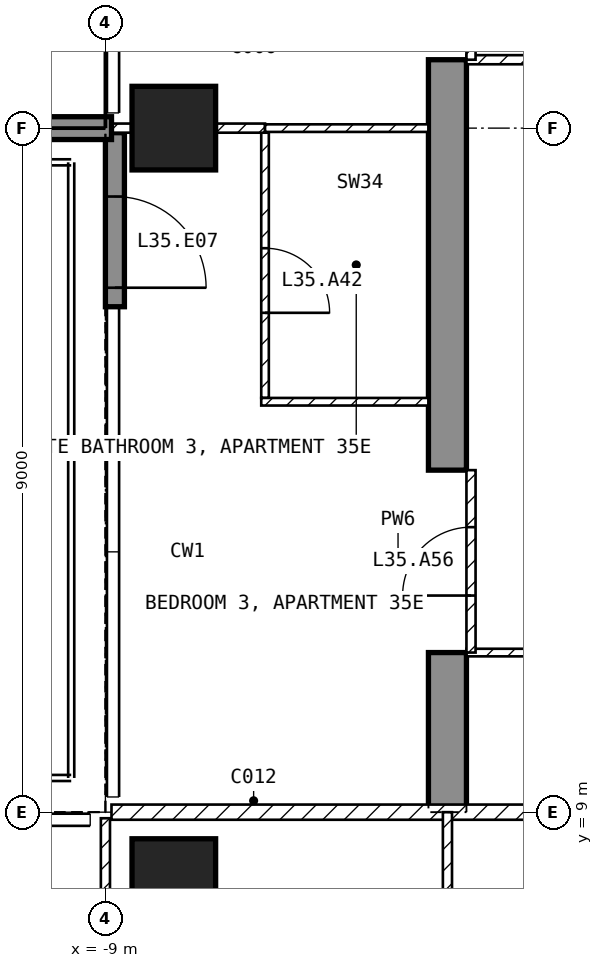
"""IFC4 building model, lengths in metres.
Left out: names, types, materials, properties, quantities, classifications, styles, units other than length and angle.
Written with IfcOpenShell. Run it as: python <this file> out.ifc"""

import sys

from ifc_helpers import new_model, si_unit, direction, frame, frame_2d, origin, origin_2d, place, context, subcontext, project, spatial, polyline, rectangle, outline, extrude, element, fill, save


model = new_model("IFC4")
c1 = context("Model", 3, precision=1e-05, world=origin(), true_north=direction((0.0, 1.0)))
c2 = subcontext(c1, "Body", "Model", "MODEL_VIEW")
j1 = project(units=[si_unit("LENGTHUNIT", "METRE"), si_unit("PLANEANGLEUNIT", "RADIAN")], contexts=[c1])
p1 = place(None, origin())
s1 = spatial("IfcSite", under=j1, at=p1, CompositionType="ELEMENT")
p2 = place(p1, origin())
s2 = spatial("IfcBuilding", under=s1, at=p2, CompositionType="ELEMENT")
p3 = place(p2, frame((0.0, 0.0, 144.4)))
s3 = spatial("IfcBuildingStorey", under=s2, at=p3, CompositionType="ELEMENT", Elevation=144.4)
for number, where, z_axis, x_axis in (
    (1, (-8.1, 8.1, -0.25), (0.0, 0.0, 1.0), (1.0, 0.0, 0.0)),
    (2, (-8.1, 18.0, -0.25), (0.0, 0.0, 1.0), (1.0, 0.0, 0.0)),
):
    element("IfcColumn", number, at=place(p3, frame(where, z_axis=z_axis, x_axis=x_axis)), inside=s3, PredefinedType="COLUMN", context=c2, shape_type="SweptSolid", body=[
        extrude(rectangle(XDim=1.1, YDim=1.1, at=origin_2d()), origin(), (0.0, 0.0, 1.0), 3.5),
    ])
p4 = place(p3, frame((-4.75, 9.0, -0.25), z_axis=(1.0, 0.0, 0.0), x_axis=(0.0, 1.0, 0.0)))
e3 = element("IfcWall", 3, at=p4, inside=s3, PredefinedType="SHEAR", context=c2, shape_type="SweptSolid", body=[
    extrude(outline(polyline([(0.0, 0.0), (2.1, 0.0), (2.1, 2.65), (4.5, 2.65), (4.5, 0.0), (9.9, 0.0), (9.9, 2.65), (12.3, 2.65), (12.3, 0.0), (16.55, 0.0), (16.55, 3.5), (0.0, 3.5), (0.0, 0.0)])), origin(), (0.0, 0.0, 1.0), 0.5),
])
p5 = place(p3, frame((-8.875, 17.94, 0.0), z_axis=(0.0, 0.0, 1.0), x_axis=(0.0, -1.0, 0.0)))
e4 = element("IfcWall", 4, at=p5, inside=s3, PredefinedType="SOLIDWALL", context=c2, shape_type="SweptSolid", body=[
    extrude(rectangle(XDim=2.29, YDim=0.25, at=frame_2d((1.145, 0.0))), origin(), (0.0, 0.0, 1.0), 3.25),
])
p6 = place(p5, frame((0.84, 0.0, 0.0)))
e5 = element("IfcOpeningElement", 5, at=p6, cuts=e4, PredefinedType="OPENING", context=c2, shape_type="SweptSolid", body=[
    extrude(rectangle(XDim=1.2, YDim=2.4, at=frame_2d((0.6, 1.2))), frame((0.0, 0.135, 0.0), z_axis=(0.0, -1.0, 0.0), x_axis=(1.0, 0.0, 0.0)), (0.0, 0.0, 1.0), 0.27),
])
p7 = place(p3, frame((-8.92, 18.0, 0.0), z_axis=(0.0, 0.0, 1.0), x_axis=(-1.0, 0.0, 0.0)))
e6 = element("IfcWall", 6, at=p7, inside=s3, PredefinedType="SOLIDWALL", context=c2, shape_type="SweptSolid", body=[
    extrude(rectangle(XDim=2.82, YDim=0.3, at=frame_2d((1.41, 0.0))), origin(), (0.0, 0.0, 1.0), 3.25),
])
p8 = place(p3, frame((-8.92, 9.0, 0.0), z_axis=(0.0, 0.0, 1.0), x_axis=(1.0, 0.0, 0.0)))
e7 = element("IfcWall", 7, at=p8, inside=s3, PredefinedType="PARTITIONING", context=c2, shape_type="SweptSolid", body=[
    extrude(rectangle(XDim=17.84, YDim=0.2, at=frame_2d((8.92, 0.0))), origin(), (0.0, 0.0, 1.0), 3.25),
])
p9 = place(p8, frame((8.42, 0.0, 0.0)))
e8 = element("IfcOpeningElement", 8, at=p9, cuts=e7, PredefinedType="OPENING", context=c2, shape_type="SweptSolid", body=[
    extrude(rectangle(XDim=1.0, YDim=2.1, at=frame_2d((0.5, 1.05))), frame((0.0, 0.11, 0.0), z_axis=(0.0, -1.0, 0.0), x_axis=(1.0, 0.0, 0.0)), (0.0, 0.0, 1.0), 0.22),
])
p10 = place(p3, frame((-9.0, 8.92, 0.0), z_axis=(0.0, 0.0, 1.0), x_axis=(0.0, -1.0, 0.0)))
e9 = element("IfcWall", 9, at=p10, inside=s3, PredefinedType="PARTITIONING", context=c2, shape_type="SweptSolid", body=[
    extrude(rectangle(XDim=7.62, YDim=0.12, at=frame_2d((3.81, 0.0))), origin(), (0.0, 0.0, 1.0), 3.25),
])
p11 = place(p10, frame((5.87, 0.0, 0.0)))
e10 = element("IfcOpeningElement", 10, at=p11, cuts=e9, PredefinedType="OPENING", context=c2, shape_type="SweptSolid", body=[
    extrude(rectangle(XDim=0.9, YDim=2.1, at=frame_2d((0.45, 1.05))), frame((0.0, 0.07, 0.0), z_axis=(0.0, -1.0, 0.0), x_axis=(1.0, 0.0, 0.0)), (0.0, 0.0, 1.0), 0.14),
])
p12 = place(p3, frame((-4.5, 9.0, 0.0), z_axis=(0.0, 0.0, 1.0), x_axis=(0.0, -1.0, 0.0)))
e11 = element("IfcWall", 11, at=p12, inside=s3, PredefinedType="PARTITIONING", context=c2, shape_type="SweptSolid", body=[
    extrude(rectangle(XDim=4.5, YDim=0.12, at=frame_2d((2.25, 0.0))), origin(), (0.0, 0.0, 1.0), 3.25),
])
p13 = place(p12, frame((1.8, 0.0, 0.0)))
e12 = element("IfcOpeningElement", 12, at=p13, cuts=e11, PredefinedType="OPENING", context=c2, shape_type="SweptSolid", body=[
    extrude(rectangle(XDim=0.9, YDim=2.1, at=frame_2d((0.45, 1.05))), frame((0.0, 0.07, 0.0), z_axis=(0.0, -1.0, 0.0), x_axis=(1.0, 0.0, 0.0)), (0.0, 0.0, 1.0), 0.14),
])
p14 = place(p3, frame((-4.25, 11.1, 0.0), z_axis=(0.0, 0.0, 1.0), x_axis=(1.0, 0.0, 0.0)))
e13 = element("IfcWall", 13, at=p14, inside=s3, PredefinedType="PARTITIONING", context=c2, shape_type="SweptSolid", body=[
    extrude(rectangle(XDim=2.15, YDim=0.1, at=frame_2d((1.075, 0.0))), origin(), (0.0, 0.0, 1.0), 3.25),
])
p15 = place(p3, frame((-4.25, 18.9, 0.0), z_axis=(0.0, 0.0, 1.0), x_axis=(1.0, 0.0, 0.0)))
e14 = element("IfcWall", 14, at=p15, inside=s3, PredefinedType="PARTITIONING", context=c2, shape_type="SweptSolid", body=[
    extrude(rectangle(XDim=8.5, YDim=0.12, at=frame_2d((4.25, 0.0))), origin(), (0.0, 0.0, 1.0), 3.25),
])
p16 = place(p15, frame((1.925, 0.0, 0.0)))
e15 = element("IfcOpeningElement", 15, at=p16, cuts=e14, PredefinedType="OPENING", context=c2, shape_type="SweptSolid", body=[
    extrude(rectangle(XDim=0.9, YDim=2.1, at=frame_2d((0.45, 1.05))), frame((0.0, 0.07, 0.0), z_axis=(0.0, -1.0, 0.0), x_axis=(1.0, 0.0, 0.0)), (0.0, 0.0, 1.0), 0.14),
])
p17 = place(p3, frame((-6.9, 17.94, 0.0), z_axis=(0.0, 0.0, 1.0), x_axis=(0.0, -1.0, 0.0)))
e16 = element("IfcWall", 16, at=p17, inside=s3, PredefinedType="PARTITIONING", context=c2, shape_type="SweptSolid", body=[
    extrude(rectangle(XDim=3.49, YDim=0.1, at=frame_2d((1.745, 0.0))), origin(), (0.0, 0.0, 1.0), 3.25),
])
p18 = place(p17, frame((1.52, 0.0, 0.0)))
e17 = element("IfcOpeningElement", 17, at=p18, cuts=e16, PredefinedType="OPENING", context=c2, shape_type="SweptSolid", body=[
    extrude(rectangle(XDim=0.85, YDim=2.1, at=frame_2d((0.425, 1.05))), frame((0.0, 0.06, 0.0), z_axis=(0.0, -1.0, 0.0), x_axis=(1.0, 0.0, 0.0)), (0.0, 0.0, 1.0), 0.12),
])
p19 = place(p3, frame((-6.95, 14.4, 0.0), z_axis=(0.0, 0.0, 1.0), x_axis=(1.0, 0.0, 0.0)))
e18 = element("IfcWall", 18, at=p19, inside=s3, PredefinedType="PARTITIONING", context=c2, shape_type="SweptSolid", body=[
    extrude(rectangle(XDim=2.2, YDim=0.1, at=frame_2d((1.1, 0.0))), origin(), (0.0, 0.0, 1.0), 3.25),
])
p20 = place(p3, frame((-8.92, 18.0, 0.0), z_axis=(0.0, 0.0, 1.0), x_axis=(1.0, 0.0, 0.0)))
e19 = element("IfcWall", 19, at=p20, inside=s3, PredefinedType="PARTITIONING", context=c2, shape_type="SweptSolid", body=[
    extrude(rectangle(XDim=2.02, YDim=0.12, at=frame_2d((1.01, 0.0))), origin(), (0.0, 0.0, 1.0), 2.414),
])
p21 = place(p3, frame((-6.9, 18.0, 0.0), z_axis=(0.0, 0.0, 1.0), x_axis=(1.0, 0.0, 0.0)))
e20 = element("IfcWall", 20, at=p21, inside=s3, PredefinedType="PARTITIONING", context=c2, shape_type="SweptSolid", body=[
    extrude(rectangle(XDim=2.15, YDim=0.1, at=frame_2d((1.075, 0.0))), origin(), (0.0, 0.0, 1.0), 2.414),
])
p22 = place(p3, frame((-4.19, 11.1, 0.0), z_axis=(0.0, 0.0, 1.0), x_axis=(0.0, 1.0, 0.0)))
e21 = element("IfcWall", 21, at=p22, inside=s3, PredefinedType="PARTITIONING", context=c2, shape_type="SweptSolid", body=[
    extrude(rectangle(XDim=2.4, YDim=0.12, at=frame_2d((1.2, 0.0))), origin(), (0.0, 0.0, 1.0), 2.4),
])
p23 = place(p22, frame((0.75, 0.0, 0.0)))
e22 = element("IfcOpeningElement", 22, at=p23, cuts=e21, PredefinedType="OPENING", context=c2, shape_type="SweptSolid", body=[
    extrude(rectangle(XDim=0.9, YDim=2.1, at=frame_2d((0.45, 1.05))), frame((0.0, 0.07, 0.0), z_axis=(0.0, -1.0, 0.0), x_axis=(1.0, 0.0, 0.0)), (0.0, 0.0, 1.0), 0.14),
])
p24 = place(p3, frame((-4.19, 18.9, 0.0), z_axis=(0.0, 0.0, 1.0), x_axis=(0.0, 1.0, 0.0)))
e23 = element("IfcWall", 23, at=p24, inside=s3, PredefinedType="PARTITIONING", context=c2, shape_type="SweptSolid", body=[
    extrude(rectangle(XDim=2.4, YDim=0.12, at=frame_2d((1.2, 0.0))), origin(), (0.0, 0.0, 1.0), 2.4),
])
p25 = place(p24, frame((0.55, 0.0, 0.0)))
e24 = element("IfcOpeningElement", 24, at=p25, cuts=e23, PredefinedType="OPENING", context=c2, shape_type="SweptSolid", body=[
    extrude(rectangle(XDim=0.9, YDim=2.1, at=frame_2d((0.45, 1.05))), frame((0.0, 0.07, 0.0), z_axis=(0.0, -1.0, 0.0), x_axis=(1.0, 0.0, 0.0)), (0.0, 0.0, 1.0), 0.14),
])
p26 = place(p6, origin())
e25 = element("IfcDoor", 25, at=p26, inside=s3, OperationType="SINGLE_SWING_RIGHT", PredefinedType="DOOR", context=c2, shape_type="SweptSolid", body=[
    extrude(rectangle(XDim=1.2, YDim=2.4, at=frame_2d((0.6, 1.2))), frame((0.0, 0.025, 0.0), z_axis=(0.0, -1.0, 0.0), x_axis=(1.0, 0.0, 0.0)), (0.0, 0.0, 1.0), 0.05),
])
fill(e5, e25)
p27 = place(p18, origin())
e26 = element("IfcDoor", 26, at=p27, inside=s3, OperationType="SINGLE_SWING_RIGHT", PredefinedType="DOOR", context=c2, shape_type="SweptSolid", body=[
    extrude(rectangle(XDim=0.85, YDim=2.1, at=frame_2d((0.425, 1.05))), frame((0.0, 0.025, 0.0), z_axis=(0.0, -1.0, 0.0), x_axis=(1.0, 0.0, 0.0)), (0.0, 0.0, 1.0), 0.05),
])
fill(e17, e26)
p28 = place(p23, origin())
e27 = element("IfcDoor", 27, at=p28, inside=s3, OperationType="SINGLE_SWING_LEFT", PredefinedType="DOOR", context=c2, shape_type="SweptSolid", body=[
    extrude(rectangle(XDim=0.9, YDim=2.1, at=frame_2d((0.45, 1.05))), frame((0.0, 0.025, 0.0), z_axis=(0.0, -1.0, 0.0), x_axis=(1.0, 0.0, 0.0)), (0.0, 0.0, 1.0), 0.05),
])
fill(e22, e27)
save(model, sys.argv[1])
